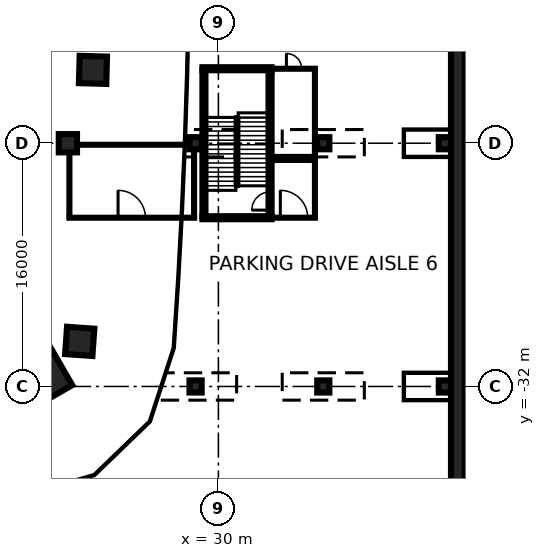
"""IFC4 building model, lengths in metres.
Left out: names, types, materials, properties, quantities, classifications, styles, units other than length and angle.
Written with IfcOpenShell. Run it as: python <this file> out.ifc"""

import sys

from ifc_helpers import new_model, si_unit, direction, frame, frame_2d, origin, origin_2d, place, context, subcontext, project, spatial, rectangle, extrude, element, fill, save


model = new_model("IFC4")
c1 = context("Model", 3, precision=1e-05, world=origin(), true_north=direction((0.0, 1.0)))
c2 = subcontext(c1, "Body", "Model", "MODEL_VIEW")
j1 = project(units=[si_unit("LENGTHUNIT", "METRE"), si_unit("PLANEANGLEUNIT", "RADIAN")], contexts=[c1])
p1 = place(None, origin())
s1 = spatial("IfcSite", under=j1, at=p1, CompositionType="ELEMENT")
p2 = place(p1, origin())
s2 = spatial("IfcBuilding", under=s1, at=p2, CompositionType="ELEMENT")
p3 = place(p2, frame((0.0, 0.0, -12.0)))
s3 = spatial("IfcBuildingStorey", under=s2, at=p3, CompositionType="ELEMENT", Elevation=-12.0)
p4 = place(p3, frame((45.75, -80.0, 0.0), z_axis=(0.0, 0.0, 1.0), x_axis=(0.0, 1.0, 0.0)))
e1 = element("IfcWall", 1, at=p4, inside=s3, PredefinedType="USERDEFINED", context=c2, shape_type="SweptSolid", body=[
    extrude(rectangle(XDim=160.0, YDim=0.9, at=frame_2d((80.0, 0.0))), origin(), (0.0, 0.0, 1.0), 11.55),
])
p5 = place(p3, frame((17.865, -30.942, 0.0), z_axis=(0.0, 0.0, 1.0), x_axis=(-0.5, 0.866025403784, 0.0)))
e2 = element("IfcColumn", 2, at=p5, inside=s3, PredefinedType="COLUMN", context=c2, shape_type="SweptSolid", body=[
    extrude(rectangle(XDim=4.2, YDim=3.4, at=origin_2d()), origin(), (0.0, 0.0, 1.0), 4.4),
])
for number, where, z_axis, x_axis in (
    (3, (20.879, -29.034, 0.0), (0.0, 0.0, 1.0), (-0.998, 0.07, 0.0)),
    (4, (21.749, -11.174, 0.0), (0.0, 0.0, 1.0), (-1.0, 0.027, 0.0)),
):
    element("IfcColumn", number, at=place(p3, frame(where, z_axis=z_axis, x_axis=x_axis)), inside=s3, PredefinedType="COLUMN", context=c2, shape_type="SweptSolid", body=[
        extrude(rectangle(XDim=1.8, YDim=1.8, at=origin_2d()), origin(), (0.0, 0.0, 1.0), 4.4),
    ])
p6 = place(p3, frame((20.1, -16.0, 0.0), z_axis=(0.0, 0.0, 1.0), x_axis=(1.0, 0.0, 0.0)))
e5 = element("IfcColumn", 5, at=p6, inside=s3, PredefinedType="COLUMN", context=c2, shape_type="SweptSolid", body=[
    extrude(rectangle(XDim=1.2, YDim=1.2, at=origin_2d()), origin(), (0.0, 0.0, 1.0), 4.4),
])
for number, where, z_axis, x_axis in (
    (6, (28.5, -32.0, 0.0), (0.0, 0.0, 1.0), (1.0, 0.0, 0.0)),
    (7, (28.5, -16.0, 0.0), (0.0, 0.0, 1.0), (1.0, 0.0, 0.0)),
    (8, (36.9, -32.0, 0.0), (0.0, 0.0, 1.0), (1.0, 0.0, 0.0)),
    (9, (36.9, -16.0, 0.0), (0.0, 0.0, 1.0), (1.0, 0.0, 0.0)),
    (10, (44.9, -32.0, 0.0), (0.0, 0.0, 1.0), (1.0, 0.0, 0.0)),
    (11, (44.9, -16.0, 0.0), (0.0, 0.0, 1.0), (1.0, 0.0, 0.0)),
):
    element("IfcColumn", number, at=place(p3, frame(where, z_axis=z_axis, x_axis=x_axis)), inside=s3, PredefinedType="COLUMN", context=c2, shape_type="SweptSolid", body=[
        extrude(rectangle(XDim=0.8, YDim=0.8, at=origin_2d()), origin(), (0.0, 0.0, 1.0), 4.4),
    ])
p7 = place(p3, frame((20.1, -20.9, 0.0), z_axis=(0.0, 0.0, 1.0), x_axis=(1.0, 0.0, 0.0)))
e12 = element("IfcWall", 12, at=p7, inside=s3, PredefinedType="PARTITIONING", context=c2, shape_type="SweptSolid", body=[
    extrude(rectangle(XDim=8.4, YDim=0.2, at=frame_2d((4.2, 0.0))), origin(), (0.0, 0.0, 1.0), 4.4),
])
p8 = place(p7, frame((3.3, 0.0, 0.0)))
e13 = element("IfcOpeningElement", 13, at=p8, cuts=e12, PredefinedType="OPENING", context=c2, shape_type="SweptSolid", body=[
    extrude(rectangle(XDim=1.8, YDim=2.1, at=frame_2d((0.9, 1.05))), frame((0.0, 0.11, 0.0), z_axis=(0.0, -1.0, 0.0), x_axis=(1.0, 0.0, 0.0)), (0.0, 0.0, 1.0), 0.22),
])
p9 = place(p3, frame((20.1, -16.1, 0.0), z_axis=(0.0, 0.0, 1.0), x_axis=(1.0, 0.0, 0.0)))
e14 = element("IfcWall", 14, at=p9, inside=s3, PredefinedType="PARTITIONING", context=c2, shape_type="SweptSolid", body=[
    extrude(rectangle(XDim=8.4, YDim=0.2, at=frame_2d((4.2, 0.0))), origin(), (0.0, 0.0, 1.0), 4.4),
])
p10 = place(p3, frame((20.2, -20.8, 0.0), z_axis=(0.0, 0.0, 1.0), x_axis=(0.0, 1.0, 0.0)))
e15 = element("IfcWall", 15, at=p10, inside=s3, PredefinedType="PARTITIONING", context=c2, shape_type="SweptSolid", body=[
    extrude(rectangle(XDim=4.2, YDim=0.2, at=frame_2d((2.1, 0.0))), origin(), (0.0, 0.0, 1.0), 4.4),
])
p11 = place(p3, frame((28.4, -20.8, 0.0), z_axis=(0.0, 0.0, 1.0), x_axis=(0.0, 1.0, 0.0)))
e16 = element("IfcWall", 16, at=p11, inside=s3, PredefinedType="PARTITIONING", context=c2, shape_type="SweptSolid", body=[
    extrude(rectangle(XDim=4.4, YDim=0.2, at=frame_2d((2.2, 0.0))), origin(), (0.0, 0.0, 1.0), 4.4),
])
p12 = place(p3, frame((33.5, -20.9, 0.0), z_axis=(0.0, 0.0, 1.0), x_axis=(1.0, 0.0, 0.0)))
e17 = element("IfcWall", 17, at=p12, inside=s3, PredefinedType="PARTITIONING", context=c2, shape_type="SweptSolid", body=[
    extrude(rectangle(XDim=2.95, YDim=0.2, at=frame_2d((1.475, 0.0))), origin(), (0.0, 0.0, 1.0), 4.4),
])
p13 = place(p12, frame((0.575, 0.0, 0.0)))
e18 = element("IfcOpeningElement", 18, at=p13, cuts=e17, PredefinedType="OPENING", context=c2, shape_type="SweptSolid", body=[
    extrude(rectangle(XDim=1.8, YDim=2.1, at=frame_2d((0.9, 1.05))), frame((0.0, 0.11, 0.0), z_axis=(0.0, -1.0, 0.0), x_axis=(1.0, 0.0, 0.0)), (0.0, 0.0, 1.0), 0.22),
])
p14 = place(p3, frame((33.5, -17.1, 0.0), z_axis=(0.0, 0.0, 1.0), x_axis=(1.0, 0.0, 0.0)))
e19 = element("IfcWall", 19, at=p14, inside=s3, PredefinedType="PARTITIONING", context=c2, shape_type="SweptSolid", body=[
    extrude(rectangle(XDim=2.95, YDim=0.2, at=frame_2d((1.475, 0.0))), origin(), (0.0, 0.0, 1.0), 4.4),
])
p15 = place(p3, frame((36.35, -20.8, 0.0), z_axis=(0.0, 0.0, 1.0), x_axis=(0.0, 1.0, 0.0)))
e20 = element("IfcWall", 20, at=p15, inside=s3, PredefinedType="PARTITIONING", context=c2, shape_type="SweptSolid", body=[
    extrude(rectangle(XDim=3.6, YDim=0.2, at=frame_2d((1.8, 0.0))), origin(), (0.0, 0.0, 1.0), 4.4),
])
p16 = place(p3, frame((33.5, -16.9, 0.0), z_axis=(0.0, 0.0, 1.0), x_axis=(1.0, 0.0, 0.0)))
e21 = element("IfcWall", 21, at=p16, inside=s3, PredefinedType="PARTITIONING", context=c2, shape_type="SweptSolid", body=[
    extrude(rectangle(XDim=2.95, YDim=0.2, at=frame_2d((1.475, 0.0))), origin(), (0.0, 0.0, 1.0), 4.4),
])
p17 = place(p3, frame((33.5, -11.1, 0.0), z_axis=(0.0, 0.0, 1.0), x_axis=(1.0, 0.0, 0.0)))
e22 = element("IfcWall", 22, at=p17, inside=s3, PredefinedType="PARTITIONING", context=c2, shape_type="SweptSolid", body=[
    extrude(rectangle(XDim=2.95, YDim=0.2, at=frame_2d((1.475, 0.0))), origin(), (0.0, 0.0, 1.0), 4.4),
])
p18 = place(p17, frame((0.975, 0.0, 0.0)))
e23 = element("IfcOpeningElement", 23, at=p18, cuts=e22, PredefinedType="OPENING", context=c2, shape_type="SweptSolid", body=[
    extrude(rectangle(XDim=1.0, YDim=2.1, at=frame_2d((0.5, 1.05))), frame((0.0, 0.11, 0.0), z_axis=(0.0, -1.0, 0.0), x_axis=(1.0, 0.0, 0.0)), (0.0, 0.0, 1.0), 0.22),
])
p19 = place(p3, frame((36.35, -16.8, 0.0), z_axis=(0.0, 0.0, 1.0), x_axis=(0.0, 1.0, 0.0)))
e24 = element("IfcWall", 24, at=p19, inside=s3, PredefinedType="PARTITIONING", context=c2, shape_type="SweptSolid", body=[
    extrude(rectangle(XDim=5.6, YDim=0.2, at=frame_2d((2.8, 0.0))), origin(), (0.0, 0.0, 1.0), 4.4),
])
p20 = place(p3, frame((29.05, -20.8, 0.0), z_axis=(0.0, 0.0, 1.0), x_axis=(0.0, 1.0, 0.0)))
e25 = element("IfcWall", 25, at=p20, inside=s3, PredefinedType="SOLIDWALL", context=c2, shape_type="SweptSolid", body=[
    extrude(rectangle(XDim=9.6, YDim=0.2, at=frame_2d((4.8, 0.0))), origin(), (0.0, 0.0, 1.0), 4.4),
])
p21 = place(p3, frame((33.4, -20.8, 0.0), z_axis=(0.0, 0.0, 1.0), x_axis=(0.0, 1.0, 0.0)))
e26 = element("IfcWall", 26, at=p21, inside=s3, PredefinedType="SOLIDWALL", context=c2, shape_type="SweptSolid", body=[
    extrude(rectangle(XDim=9.6, YDim=0.2, at=frame_2d((4.8, 0.0))), origin(), (0.0, 0.0, 1.0), 4.4),
])
p22 = place(p21, frame((0.4, 0.0, 0.0)))
e27 = element("IfcOpeningElement", 27, at=p22, cuts=e26, PredefinedType="OPENING", context=c2, shape_type="SweptSolid", body=[
    extrude(rectangle(XDim=1.2, YDim=2.1, at=frame_2d((0.6, 1.05))), frame((0.0, 0.11, 0.0), z_axis=(0.0, -1.0, 0.0), x_axis=(1.0, 0.0, 0.0)), (0.0, 0.0, 1.0), 0.22),
])
for number, where, z_axis, x_axis in (
    (28, (33.5, -20.9, 0.0), (0.0, 0.0, 1.0), (-1.0, 0.0, 0.0)),
    (29, (28.95, -11.1, 0.0), (0.0, 0.0, 1.0), (1.0, 0.0, 0.0)),
):
    element("IfcWall", number, at=place(p3, frame(where, z_axis=z_axis, x_axis=x_axis)), inside=s3, PredefinedType="SOLIDWALL", context=c2, shape_type="SweptSolid", body=[
        extrude(rectangle(XDim=4.55, YDim=0.2, at=frame_2d((2.275, 0.0))), origin(), (0.0, 0.0, 1.0), 4.4),
    ])
p23 = place(p8, origin())
e30 = element("IfcDoor", 30, at=p23, inside=s3, OperationType="DOUBLE_DOOR_SINGLE_SWING", PredefinedType="DOOR", context=c2, shape_type="SweptSolid", body=[
    extrude(rectangle(XDim=1.8, YDim=2.1, at=frame_2d((0.9, 1.05))), frame((0.0, 0.025, 0.0), z_axis=(0.0, -1.0, 0.0), x_axis=(1.0, 0.0, 0.0)), (0.0, 0.0, 1.0), 0.05),
])
fill(e13, e30)
p24 = place(p13, origin())
e31 = element("IfcDoor", 31, at=p24, inside=s3, OperationType="DOUBLE_DOOR_SINGLE_SWING", PredefinedType="DOOR", context=c2, shape_type="SweptSolid", body=[
    extrude(rectangle(XDim=1.8, YDim=2.1, at=frame_2d((0.9, 1.05))), frame((0.0, 0.025, 0.0), z_axis=(0.0, -1.0, 0.0), x_axis=(1.0, 0.0, 0.0)), (0.0, 0.0, 1.0), 0.05),
])
fill(e18, e31)
p25 = place(p18, origin())
e32 = element("IfcDoor", 32, at=p25, inside=s3, OperationType="SINGLE_SWING_LEFT", PredefinedType="DOOR", context=c2, shape_type="SweptSolid", body=[
    extrude(rectangle(XDim=1.0, YDim=2.1, at=frame_2d((0.5, 1.05))), frame((0.0, 0.025, 0.0), z_axis=(0.0, -1.0, 0.0), x_axis=(1.0, 0.0, 0.0)), (0.0, 0.0, 1.0), 0.05),
])
fill(e23, e32)
p26 = place(p22, origin())
e33 = element("IfcDoor", 33, at=p26, inside=s3, OperationType="SINGLE_SWING_LEFT", PredefinedType="DOOR", context=c2, shape_type="SweptSolid", body=[
    extrude(rectangle(XDim=1.2, YDim=2.1, at=frame_2d((0.6, 1.05))), frame((0.0, 0.025, 0.0), z_axis=(0.0, -1.0, 0.0), x_axis=(1.0, 0.0, 0.0)), (0.0, 0.0, 1.0), 0.05),
])
fill(e27, e33)
save(model, sys.argv[1])
